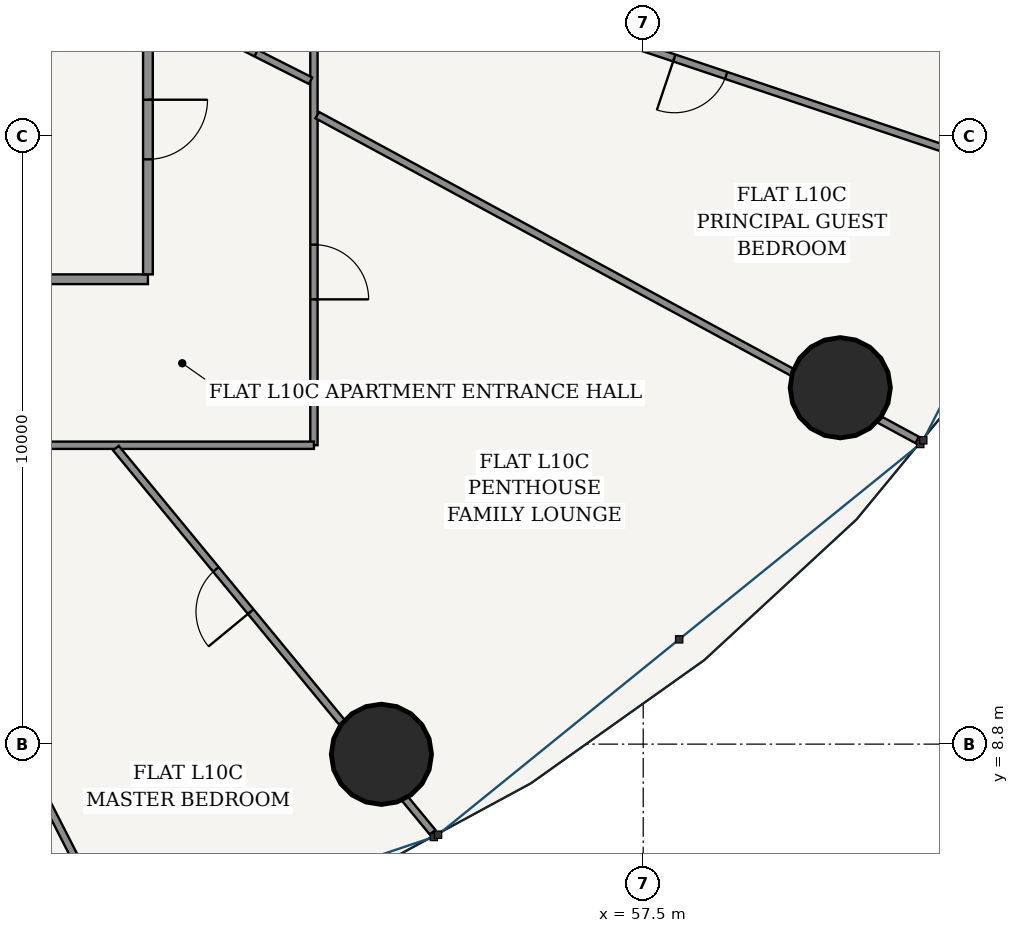
"""IFC4 building model, lengths in metres.
Left out: names, types, materials, properties, quantities, classifications, styles, units other than length and angle.
Written with IfcOpenShell. Run it as: python <this file> out.ifc"""

import sys

from ifc_helpers import new_model, si_unit, direction, frame, frame_2d, origin, origin_2d, place, context, subcontext, project, spatial, rectangle, hollow_circle, extrude, source, transform, mapped, element, fill, save


model = new_model("IFC4")
c1 = context("Model", 3, precision=1e-05, world=origin(), true_north=direction((-0.2419218956, 0.970295726276)))
c2 = subcontext(c1, "Body", "Model", "MODEL_VIEW")
j1 = project(units=[si_unit("LENGTHUNIT", "METRE"), si_unit("PLANEANGLEUNIT", "RADIAN")], contexts=[c1])
p1 = place(None, origin())
s1 = spatial("IfcSite", under=j1, at=p1, CompositionType="ELEMENT")
p2 = place(p1, origin())
s2 = spatial("IfcBuilding", under=s1, at=p2, CompositionType="ELEMENT")
p3 = place(p2, frame((0.0, 0.0, 42.0)))
s3 = spatial("IfcBuildingStorey", under=s2, at=p3, CompositionType="ELEMENT", Elevation=42.0)
for number, where, z_axis, x_axis in (
    (1, (53.195, 8.632, 0.0), (0.0, 0.0, 1.0), (1.0, 0.0, 0.0)),
    (2, (60.741, 14.661, 0.0), (0.0, 0.0, 1.0), (1.0, 0.0, 0.0)),
):
    element("IfcColumn", number, at=place(p3, frame(where, z_axis=z_axis, x_axis=x_axis)), inside=s3, PredefinedType="COLUMN", context=c2, shape_type="SweptSolid", body=[
        extrude(hollow_circle(Radius=0.825, WallThickness=0.05, at=origin_2d()), origin(), (0.0, 0.0, 1.0), 3.6),
    ])
p4 = place(p3, frame((26.645, 16.445, 0.0), z_axis=(0.0, 0.0, 1.0), x_axis=(1.0, 0.0, 0.0)))
e3 = element("IfcWall", 3, at=p4, inside=s3, PredefinedType="PARTITIONING", context=c2, shape_type="SweptSolid", body=[
    extrude(rectangle(XDim=22.71, YDim=0.16, at=frame_2d((11.355, 0.0))), origin(), (0.0, 0.0, 1.0), 2.688),
])
p5 = place(p3, frame((49.355, 16.525, 0.0), z_axis=(0.0, 0.0, 1.0), x_axis=(0.0, 1.0, 0.0)))
e4 = element("IfcWall", 4, at=p5, inside=s3, PredefinedType="PARTITIONING", context=c2, shape_type="SweptSolid", body=[
    extrude(rectangle(XDim=20.55, YDim=0.16, at=frame_2d((10.275, 0.0))), origin(), (0.0, 0.0, 1.0), 2.688),
])
p6 = place(p5, frame((17.207, 0.0, 0.0)))
e5 = element("IfcOpeningElement", 5, at=p6, cuts=e4, PredefinedType="OPENING", context=c2, shape_type="SweptSolid", body=[
    extrude(rectangle(XDim=0.98, YDim=2.2, at=frame_2d((0.49, 1.1))), frame((0.0, 0.09, 0.0), z_axis=(0.0, -1.0, 0.0), x_axis=(1.0, 0.0, 0.0)), (0.0, 0.0, 1.0), 0.18),
])
p7 = place(p5, frame((1.892, 0.0, 0.0)))
e6 = element("IfcOpeningElement", 6, at=p7, cuts=e4, PredefinedType="OPENING", context=c2, shape_type="SweptSolid", body=[
    extrude(rectangle(XDim=0.98, YDim=2.2, at=frame_2d((0.49, 1.1))), frame((0.0, 0.09, 0.0), z_axis=(0.0, -1.0, 0.0), x_axis=(1.0, 0.0, 0.0)), (0.0, 0.0, 1.0), 0.18),
])
p8 = place(p3, frame((52.085, 28.968, 0.0), z_axis=(0.0, 0.0, 1.0), x_axis=(0.0, -1.0, 0.0)))
e7 = element("IfcWall", 7, at=p8, inside=s3, PredefinedType="PARTITIONING", context=c2, shape_type="SweptSolid", body=[
    extrude(rectangle(XDim=15.253, YDim=0.12, at=frame_2d((7.626, 0.0))), origin(), (0.0, 0.0, 1.0), 2.688),
])
p9 = place(p8, frame((11.954, 0.0, 0.0)))
e8 = element("IfcOpeningElement", 8, at=p9, cuts=e7, PredefinedType="OPENING", context=c2, shape_type="SweptSolid", body=[
    extrude(rectangle(XDim=0.9, YDim=2.15, at=frame_2d((0.45, 1.075))), frame((0.0, 0.07, 0.0), z_axis=(0.0, -1.0, 0.0), x_axis=(1.0, 0.0, 0.0)), (0.0, 0.0, 1.0), 0.14),
])
p10 = place(p8, frame((5.182, 0.0, 0.0)))
e9 = element("IfcOpeningElement", 9, at=p10, cuts=e7, PredefinedType="OPENING", context=c2, shape_type="SweptSolid", body=[
    extrude(rectangle(XDim=0.9, YDim=2.15, at=frame_2d((0.45, 1.075))), frame((0.0, 0.07, 0.0), z_axis=(0.0, -1.0, 0.0), x_axis=(1.0, 0.0, 0.0)), (0.0, 0.0, 1.0), 0.14),
])
p11 = place(p8, frame((1.889, 0.0, 0.0)))
e10 = element("IfcOpeningElement", 10, at=p11, cuts=e7, PredefinedType="OPENING", context=c2, shape_type="SweptSolid", body=[
    extrude(rectangle(XDim=0.9, YDim=2.15, at=frame_2d((0.45, 1.075))), frame((0.0, 0.07, 0.0), z_axis=(0.0, -1.0, 0.0), x_axis=(1.0, 0.0, 0.0)), (0.0, 0.0, 1.0), 0.14),
])
p12 = place(p3, frame((52.085, 13.715, 0.0), z_axis=(0.0, 0.0, 1.0), x_axis=(-1.0, 0.0, 0.0)))
e11 = element("IfcWall", 11, at=p12, inside=s3, PredefinedType="PARTITIONING", context=c2, shape_type="SweptSolid", body=[
    extrude(rectangle(XDim=24.772, YDim=0.12, at=frame_2d((12.386, 0.0))), origin(), (0.0, 0.0, 1.0), 2.688),
])
p13 = place(p12, frame((20.912, 0.0, 0.0)))
e12 = element("IfcOpeningElement", 12, at=p13, cuts=e11, PredefinedType="OPENING", context=c2, shape_type="SweptSolid", body=[
    extrude(rectangle(XDim=0.86, YDim=2.15, at=frame_2d((0.43, 1.075))), frame((0.0, 0.07, 0.0), z_axis=(0.0, -1.0, 0.0), x_axis=(1.0, 0.0, 0.0)), (0.0, 0.0, 1.0), 0.14),
])
p14 = place(p12, frame((13.87, 0.0, 0.0)))
e13 = element("IfcOpeningElement", 13, at=p14, cuts=e11, PredefinedType="OPENING", context=c2, shape_type="SweptSolid", body=[
    extrude(rectangle(XDim=0.9, YDim=2.15, at=frame_2d((0.45, 1.075))), frame((0.0, 0.07, 0.0), z_axis=(0.0, -1.0, 0.0), x_axis=(1.0, 0.0, 0.0)), (0.0, 0.0, 1.0), 0.14),
])
p15 = place(p3, frame((44.717, 13.66, 0.0), z_axis=(0.0, 0.0, 1.0), x_axis=(0.455131303234, -0.890424335256, 0.0)))
e14 = element("IfcWall", 14, at=p15, inside=s3, PredefinedType="PARTITIONING", context=c2, shape_type="SweptSolid", body=[
    extrude(rectangle(XDim=9.562, YDim=0.12, at=frame_2d((4.781, 0.0))), origin(), (0.0, 0.0, 1.0), 2.762),
])
p16 = place(p15, frame((4.331, 0.0, 0.0)))
e15 = element("IfcOpeningElement", 15, at=p16, cuts=e14, PredefinedType="OPENING", context=c2, shape_type="SweptSolid", body=[
    extrude(rectangle(XDim=0.9, YDim=2.15, at=frame_2d((0.45, 1.075))), frame((0.0, 0.07, 0.0), z_axis=(0.0, -1.0, 0.0), x_axis=(1.0, 0.0, 0.0)), (0.0, 0.0, 1.0), 0.14),
])
p17 = place(p3, frame((48.829, 13.667, 0.0), z_axis=(0.0, 0.0, 1.0), x_axis=(0.636177533893, -0.771542704826, 0.0)))
e16 = element("IfcWall", 16, at=p17, inside=s3, PredefinedType="PARTITIONING", context=c2, shape_type="SweptSolid", body=[
    extrude(rectangle(XDim=8.187, YDim=0.12, at=frame_2d((4.093, 0.0))), origin(), (0.0, 0.0, 1.0), 2.688),
])
p18 = place(p17, frame((2.584, 0.0, 0.0)))
e17 = element("IfcOpeningElement", 17, at=p18, cuts=e16, PredefinedType="OPENING", context=c2, shape_type="SweptSolid", body=[
    extrude(rectangle(XDim=0.9, YDim=2.15, at=frame_2d((0.45, 1.075))), frame((0.0, 0.07, 0.0), z_axis=(0.0, -1.0, 0.0), x_axis=(1.0, 0.0, 0.0)), (0.0, 0.0, 1.0), 0.14),
])
p19 = place(p3, frame((52.139, 19.144, 0.0), z_axis=(0.0, 0.0, 1.0), x_axis=(0.879372452045, -0.476134529922, 0.0)))
e18 = element("IfcWall", 18, at=p19, inside=s3, PredefinedType="PARTITIONING", context=c2, shape_type="SweptSolid", body=[
    extrude(rectangle(XDim=11.219, YDim=0.12, at=frame_2d((5.61, 0.0))), origin(), (0.0, 0.0, 1.0), 2.688),
])
p20 = place(p3, frame((52.144, 22.052, 0.0), z_axis=(0.0, 0.0, 1.0), x_axis=(0.948023034133, -0.318201707653, 0.0)))
e19 = element("IfcWall", 19, at=p20, inside=s3, PredefinedType="PARTITIONING", context=c2, shape_type="SweptSolid", body=[
    extrude(rectangle(XDim=13.279, YDim=0.12, at=frame_2d((6.639, 0.0))), origin(), (0.0, 0.0, 1.0), 2.762),
])
p21 = place(p20, frame((6.189, 0.0, 0.0)))
e20 = element("IfcOpeningElement", 20, at=p21, cuts=e19, PredefinedType="OPENING", context=c2, shape_type="SweptSolid", body=[
    extrude(rectangle(XDim=0.9, YDim=2.15, at=frame_2d((0.45, 1.075))), frame((0.0, 0.07, 0.0), z_axis=(0.0, -1.0, 0.0), x_axis=(1.0, 0.0, 0.0)), (0.0, 0.0, 1.0), 0.14),
])
p22 = place(p3, frame((49.435, 21.021, 0.0), z_axis=(0.0, 0.0, 1.0), x_axis=(0.892504324967, -0.451038834155, 0.0)))
e21 = element("IfcWall", 21, at=p22, inside=s3, PredefinedType="PARTITIONING", context=c2, shape_type="SweptSolid", body=[
    extrude(rectangle(XDim=2.907, YDim=0.12, at=frame_2d((1.454, 0.0))), origin(), (0.0, 0.0, 1.0), 3.32),
])
p23 = place(p22, frame((1.004, 0.0, 0.0)))
e22 = element("IfcOpeningElement", 22, at=p23, cuts=e21, PredefinedType="OPENING", context=c2, shape_type="SweptSolid", body=[
    extrude(rectangle(XDim=0.9, YDim=2.15, at=frame_2d((0.45, 1.075))), frame((0.0, 0.07, 0.0), z_axis=(0.0, -1.0, 0.0), x_axis=(1.0, 0.0, 0.0)), (0.0, 0.0, 1.0), 0.14),
])
m1 = source(origin(), c2, "Body", "SweptSolid", [
    extrude(rectangle(XDim=0.98, YDim=2.2, at=frame_2d((0.49, 1.1))), frame((0.0, 0.025, 0.0), z_axis=(0.0, -1.0, 0.0), x_axis=(1.0, 0.0, 0.0)), (0.0, 0.0, 1.0), 0.05),
])
p24 = place(p7, frame((0.98, 0.0, 0.0), z_axis=(0.0, 0.0, 1.0), x_axis=(-1.0, 0.0, 0.0)))
e23 = element("IfcDoor", 23, at=p24, inside=s3, OperationType="SINGLE_SWING_LEFT", PredefinedType="DOOR", context=c2, shape_type="MappedRepresentation", body=[
    mapped(m1, transform((0.0, 0.0, 0.0), scale=1.0)),
])
fill(e6, e23)
m2 = source(origin(), c2, "Body", "SweptSolid", [
    extrude(rectangle(XDim=0.9, YDim=2.15, at=frame_2d((0.45, 1.075))), frame((0.0, 0.025, 0.0), z_axis=(0.0, -1.0, 0.0), x_axis=(1.0, 0.0, 0.0)), (0.0, 0.0, 1.0), 0.05),
])
p25 = place(p23, origin())
e24 = element("IfcDoor", 24, at=p25, inside=s3, OperationType="SINGLE_SWING_LEFT", PredefinedType="DOOR", context=c2, shape_type="MappedRepresentation", body=[
    mapped(m2, transform((0.0, 0.0, 0.0), scale=1.0)),
])
fill(e22, e24)
p26 = place(p9, origin())
e25 = element("IfcDoor", 25, at=p26, inside=s3, OperationType="SINGLE_SWING_RIGHT", PredefinedType="DOOR", context=c2, shape_type="MappedRepresentation", body=[
    mapped(m2, transform((0.0, 0.0, 0.0), scale=1.0)),
])
fill(e8, e25)
p27 = place(p18, frame((0.9, 0.0, 0.0), z_axis=(0.0, 0.0, 1.0), x_axis=(-1.0, 0.0, 0.0)))
e26 = element("IfcDoor", 26, at=p27, inside=s3, OperationType="SINGLE_SWING_LEFT", PredefinedType="DOOR", context=c2, shape_type="MappedRepresentation", body=[
    mapped(m2, transform((0.0, 0.0, 0.0), scale=1.0)),
])
fill(e17, e26)
p28 = place(p21, frame((0.9, 0.0, 0.0), z_axis=(0.0, 0.0, 1.0), x_axis=(-1.0, 0.0, 0.0)))
e27 = element("IfcDoor", 27, at=p28, inside=s3, OperationType="SINGLE_SWING_RIGHT", PredefinedType="DOOR", context=c2, shape_type="MappedRepresentation", body=[
    mapped(m2, transform((0.0, 0.0, 0.0), scale=1.0)),
])
fill(e20, e27)
save(model, sys.argv[1])
